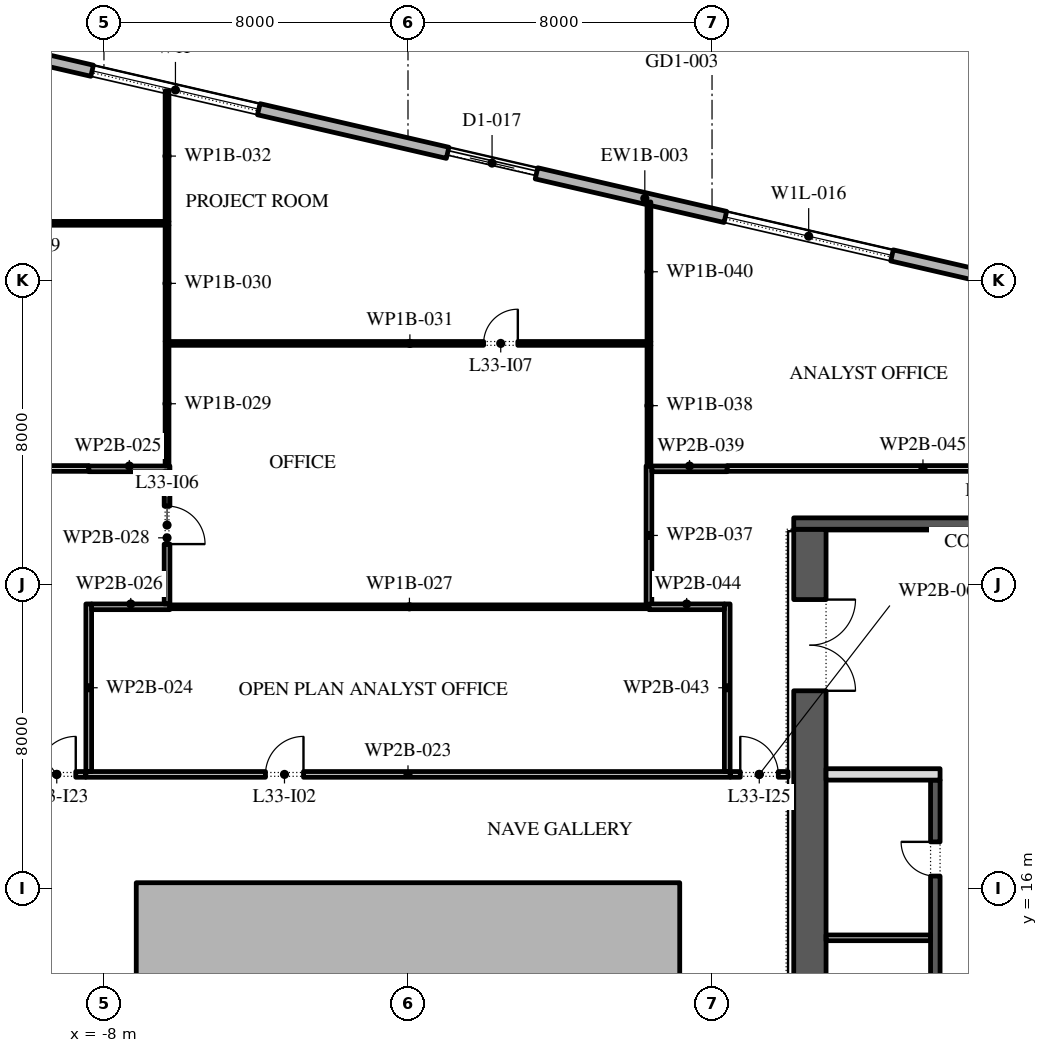
"""IFC4 building model, lengths in metres.
Left out: names, types, materials, properties, quantities, classifications, styles, units other than length and angle.
Written with IfcOpenShell. Run it as: python <this file> out.ifc"""

import sys

from ifc_helpers import new_model, si_unit, direction, frame, frame_2d, origin, place, context, subcontext, project, spatial, polyline, rectangle, outline, extrude, element, fill, save


model = new_model("IFC4")
c1 = context("Model", 3, precision=1e-05, world=origin(), true_north=direction((0.0, 1.0)))
c2 = subcontext(c1, "Body", "Model", "MODEL_VIEW")
j1 = project(units=[si_unit("LENGTHUNIT", "METRE"), si_unit("PLANEANGLEUNIT", "RADIAN")], contexts=[c1])
p1 = place(None, origin())
s1 = spatial("IfcSite", under=j1, at=p1, CompositionType="ELEMENT")
p2 = place(p1, origin())
s2 = spatial("IfcBuilding", under=s1, at=p2, CompositionType="ELEMENT")
p3 = place(p2, frame((0.0, 0.0, 151.8)))
s3 = spatial("IfcBuildingStorey", under=s2, at=p3, CompositionType="ELEMENT", Elevation=151.8)
p4 = place(p3, origin())
e1 = element("IfcWall", 1, at=p4, inside=s3, PredefinedType="STANDARD", context=c2, shape_type="SweptSolid", body=[
    extrude(outline(polyline([(-7.15, -2.15), (7.15, -2.15), (7.15, 16.15), (-7.15, 16.15), (-7.15, -2.15)]), holes=[polyline([(-7.0, -2.0), (-7.0, 16.0), (7.0, 16.0), (7.0, -2.0), (-7.0, -2.0)])]), origin(), (0.0, 0.0, 1.0), 3.95),
])
p5 = place(p3, frame((31.078, 28.421, 0.0), z_axis=(0.0, 0.0, 1.0), x_axis=(-0.974370456532, 0.224949357493, 0.0)))
e2 = element("IfcWall", 2, at=p5, inside=s3, PredefinedType="STANDARD", context=c2, shape_type="SweptSolid", body=[
    extrude(rectangle(XDim=51.0, YDim=0.3, at=frame_2d((25.5, 0.0))), origin(), (0.0, 0.0, 1.0), 3.95),
])
p6 = place(p5, frame((1.875, 0.0, 0.45)))
e3 = element("IfcOpeningElement", 3, at=p6, cuts=e2, PredefinedType="OPENING", context=c2, shape_type="SweptSolid", body=[
    extrude(rectangle(XDim=4.5, YDim=2.775, at=frame_2d((2.25, 1.387))), frame((0.0, 0.16, 0.0), z_axis=(0.0, -1.0, 0.0), x_axis=(1.0, 0.0, 0.0)), (0.0, 0.0, 1.0), 0.32),
])
p7 = place(p5, frame((10.275, 0.0, 0.45)))
e4 = element("IfcOpeningElement", 4, at=p7, cuts=e2, PredefinedType="OPENING", context=c2, shape_type="SweptSolid", body=[
    extrude(rectangle(XDim=4.5, YDim=3.05, at=frame_2d((2.25, 1.525))), frame((0.0, 0.16, 0.0), z_axis=(0.0, -1.0, 0.0), x_axis=(1.0, 0.0, 0.0)), (0.0, 0.0, 1.0), 0.32),
])
p8 = place(p5, frame((18.825, 0.0, 0.45)))
e5 = element("IfcOpeningElement", 5, at=p8, cuts=e2, PredefinedType="OPENING", context=c2, shape_type="SweptSolid", body=[
    extrude(rectangle(XDim=4.5, YDim=2.625, at=frame_2d((2.25, 1.312))), frame((0.0, 0.16, 0.0), z_axis=(0.0, -1.0, 0.0), x_axis=(1.0, 0.0, 0.0)), (0.0, 0.0, 1.0), 0.32),
])
p9 = place(p5, frame((28.425, 0.0, 0.0)))
e6 = element("IfcOpeningElement", 6, at=p9, cuts=e2, PredefinedType="OPENING", context=c2, shape_type="SweptSolid", body=[
    extrude(rectangle(XDim=2.4, YDim=3.5, at=frame_2d((1.2, 1.75))), frame((0.0, 0.16, 0.0), z_axis=(0.0, -1.0, 0.0), x_axis=(1.0, 0.0, 0.0)), (0.0, 0.0, 1.0), 0.32),
])
p10 = place(p5, frame((35.925, 0.0, 0.45)))
e7 = element("IfcOpeningElement", 7, at=p10, cuts=e2, PredefinedType="OPENING", context=c2, shape_type="SweptSolid", body=[
    extrude(rectangle(XDim=4.5, YDim=2.475, at=frame_2d((2.25, 1.238))), frame((0.0, 0.16, 0.0), z_axis=(0.0, -1.0, 0.0), x_axis=(1.0, 0.0, 0.0)), (0.0, 0.0, 1.0), 0.32),
])
p11 = place(p5, frame((44.475, 0.0, 0.45)))
e8 = element("IfcOpeningElement", 8, at=p11, cuts=e2, PredefinedType="OPENING", context=c2, shape_type="SweptSolid", body=[
    extrude(rectangle(XDim=4.5, YDim=2.4, at=frame_2d((2.25, 1.2))), frame((0.0, 0.16, 0.0), z_axis=(0.0, -1.0, 0.0), x_axis=(1.0, 0.0, 0.0)), (0.0, 0.0, 1.0), 0.32),
])
p12 = place(p3, frame((10.575, -2.45, 0.0), z_axis=(0.0, 0.0, 1.0), x_axis=(0.0, 1.0, 0.0)))
e9 = element("IfcWall", 9, at=p12, inside=s3, PredefinedType="SHEAR", context=c2, shape_type="SweptSolid", body=[
    extrude(rectangle(XDim=27.9, YDim=0.85, at=frame_2d((13.95, 0.0))), origin(), (0.0, 0.0, 1.0), 3.95),
])
p13 = place(p12, frame((23.65, 0.0, 0.0)))
e10 = element("IfcOpeningElement", 10, at=p13, cuts=e9, PredefinedType="OPENING", context=c2, shape_type="SweptSolid", body=[
    extrude(rectangle(XDim=2.4, YDim=2.1, at=frame_2d((1.2, 1.05))), frame((0.0, 0.435, 0.0), z_axis=(0.0, -1.0, 0.0), x_axis=(1.0, 0.0, 0.0)), (0.0, 0.0, 1.0), 0.87),
])
p14 = place(p12, frame((0.788, 0.0, 0.0)))
e11 = element("IfcOpeningElement", 11, at=p14, cuts=e9, PredefinedType="OPENING", context=c2, shape_type="SweptSolid", body=[
    extrude(rectangle(XDim=0.9, YDim=2.1, at=frame_2d((0.45, 1.05))), frame((0.0, 0.435, 0.0), z_axis=(0.0, -1.0, 0.0), x_axis=(1.0, 0.0, 0.0)), (0.0, 0.0, 1.0), 0.87),
])
p15 = place(p12, frame((3.962, 0.0, 0.0)))
e12 = element("IfcOpeningElement", 12, at=p15, cuts=e9, PredefinedType="OPENING", context=c2, shape_type="SweptSolid", body=[
    extrude(rectangle(XDim=1.0, YDim=2.1, at=frame_2d((0.5, 1.05))), frame((0.0, 0.435, 0.0), z_axis=(0.0, -1.0, 0.0), x_axis=(1.0, 0.0, 0.0)), (0.0, 0.0, 1.0), 0.87),
])
p16 = place(p3, frame((10.15, 25.6, 0.0), z_axis=(0.0, 0.0, 1.0), x_axis=(1.0, 0.0, 0.0)))
e13 = element("IfcWall", 13, at=p16, inside=s3, PredefinedType="SHEAR", context=c2, shape_type="SweptSolid", body=[
    extrude(rectangle(XDim=11.7, YDim=0.3, at=frame_2d((5.85, 0.0))), origin(), (0.0, 0.0, 1.0), 3.95),
])
p17 = place(p3, frame((13.875, -2.45, 0.0), z_axis=(0.0, 0.0, 1.0), x_axis=(0.0, 1.0, 0.0)))
e14 = element("IfcWall", 14, at=p17, inside=s3, PredefinedType="SHEAR", context=c2, shape_type="SweptSolid", body=[
    extrude(rectangle(XDim=21.3, YDim=0.25, at=frame_2d((10.65, 0.0))), origin(), (0.0, 0.0, 1.0), 3.95),
])
p18 = place(p17, frame((10.396, 0.0, 0.0)))
e15 = element("IfcOpeningElement", 15, at=p18, cuts=e14, PredefinedType="OPENING", context=c2, shape_type="SweptSolid", body=[
    extrude(rectangle(XDim=0.9, YDim=2.1, at=frame_2d((0.45, 1.05))), frame((0.0, 0.135, 0.0), z_axis=(0.0, -1.0, 0.0), x_axis=(1.0, 0.0, 0.0)), (0.0, 0.0, 1.0), 0.27),
])
p19 = place(p17, frame((14.6, 0.0, 0.0)))
e16 = element("IfcOpeningElement", 16, at=p19, cuts=e14, PredefinedType="OPENING", context=c2, shape_type="SweptSolid", body=[
    extrude(rectangle(XDim=0.9, YDim=2.1, at=frame_2d((0.45, 1.05))), frame((0.0, 0.135, 0.0), z_axis=(0.0, -1.0, 0.0), x_axis=(1.0, 0.0, 0.0)), (0.0, 0.0, 1.0), 0.27),
])
p20 = place(p17, frame((18.775, 0.0, 0.0)))
e17 = element("IfcOpeningElement", 17, at=p20, cuts=e14, PredefinedType="OPENING", context=c2, shape_type="SweptSolid", body=[
    extrude(rectangle(XDim=0.9, YDim=2.1, at=frame_2d((0.45, 1.05))), frame((0.0, 0.135, 0.0), z_axis=(0.0, -1.0, 0.0), x_axis=(1.0, 0.0, 0.0)), (0.0, 0.0, 1.0), 0.27),
])
p21 = place(p17, frame((6.971, 0.0, 0.0)))
e18 = element("IfcOpeningElement", 18, at=p21, cuts=e14, PredefinedType="OPENING", context=c2, shape_type="SweptSolid", body=[
    extrude(rectangle(XDim=1.1, YDim=2.1, at=frame_2d((0.55, 1.05))), frame((0.0, 0.135, 0.0), z_axis=(0.0, -1.0, 0.0), x_axis=(1.0, 0.0, 0.0)), (0.0, 0.0, 1.0), 0.27),
])
p22 = place(p3, frame((11.0, 19.0, 0.0), z_axis=(0.0, 0.0, 1.0), x_axis=(1.0, 0.0, 0.0)))
e19 = element("IfcWall", 19, at=p22, inside=s3, PredefinedType="PARTITIONING", context=c2, shape_type="SweptSolid", body=[
    extrude(rectangle(XDim=3.0, YDim=0.3, at=frame_2d((1.5, 0.0))), origin(), (0.0, 0.0, 1.0), 3.95),
])
p23 = place(p3, frame((11.0, 14.7, 0.0), z_axis=(0.0, 0.0, 1.0), x_axis=(1.0, 0.0, 0.0)))
e20 = element("IfcWall", 20, at=p23, inside=s3, PredefinedType="PARTITIONING", context=c2, shape_type="SweptSolid", body=[
    extrude(rectangle(XDim=2.75, YDim=0.15, at=frame_2d((1.375, 0.0))), origin(), (0.0, 0.0, 1.0), 3.95),
])
p24 = place(p3, frame((-18.65, 27.05, 0.0), z_axis=(0.0, 0.0, 1.0), x_axis=(1.0, 0.0, 0.0)))
e21 = element("IfcWall", 21, at=p24, inside=s3, PredefinedType="PARTITIONING", context=c2, shape_type="SweptSolid", body=[
    extrude(rectangle(XDim=10.25, YDim=0.15, at=frame_2d((5.125, 0.0))), origin(), (0.0, 0.0, 1.0), 3.95),
])
p25 = place(p24, frame((3.6, 0.0, 0.0)))
e22 = element("IfcOpeningElement", 22, at=p25, cuts=e21, PredefinedType="OPENING", context=c2, shape_type="SweptSolid", body=[
    extrude(rectangle(XDim=1.0, YDim=2.1, at=frame_2d((0.5, 1.05))), frame((0.0, 0.085, 0.0), z_axis=(0.0, -1.0, 0.0), x_axis=(1.0, 0.0, 0.0)), (0.0, 0.0, 1.0), 0.17),
])
p26 = place(p3, frame((-18.6, 33.5, 0.0), z_axis=(0.0, 0.0, 1.0), x_axis=(1.0, 0.0, 0.0)))
e23 = element("IfcWall", 23, at=p26, inside=s3, PredefinedType="PARTITIONING", context=c2, shape_type="SweptSolid", body=[
    extrude(rectangle(XDim=12.31, YDim=0.1, at=frame_2d((6.155, 0.0))), origin(), (0.0, 0.0, 1.0), 3.95),
])
p27 = place(p26, frame((8.16, 0.0, 0.0)))
e24 = element("IfcOpeningElement", 24, at=p27, cuts=e23, PredefinedType="OPENING", context=c2, shape_type="SweptSolid", body=[
    extrude(rectangle(XDim=0.9, YDim=2.1, at=frame_2d((0.45, 1.05))), frame((0.0, 0.06, 0.0), z_axis=(0.0, -1.0, 0.0), x_axis=(1.0, 0.0, 0.0)), (0.0, 0.0, 1.0), 0.12),
])
p28 = place(p3, frame((-8.475, 19.0, 0.0), z_axis=(0.0, 0.0, 1.0), x_axis=(1.0, 0.0, 0.0)))
e25 = element("IfcWall", 25, at=p28, inside=s3, PredefinedType="PARTITIONING", context=c2, shape_type="SweptSolid", body=[
    extrude(rectangle(XDim=16.95, YDim=0.15, at=frame_2d((8.475, 0.0))), origin(), (0.0, 0.0, 1.0), 3.95),
])
p29 = place(p28, frame((4.725, 0.0, 0.0)))
e26 = element("IfcOpeningElement", 26, at=p29, cuts=e25, PredefinedType="OPENING", context=c2, shape_type="SweptSolid", body=[
    extrude(rectangle(XDim=1.0, YDim=2.1, at=frame_2d((0.5, 1.05))), frame((0.0, 0.085, 0.0), z_axis=(0.0, -1.0, 0.0), x_axis=(1.0, 0.0, 0.0)), (0.0, 0.0, 1.0), 0.17),
])
p30 = place(p3, frame((-8.4, 23.485, 0.0), z_axis=(0.0, 0.0, 1.0), x_axis=(0.0, -1.0, 0.0)))
e27 = element("IfcWall", 27, at=p30, inside=s3, PredefinedType="PARTITIONING", context=c2, shape_type="SweptSolid", body=[
    extrude(rectangle(XDim=4.41, YDim=0.15, at=frame_2d((2.205, 0.0))), origin(), (0.0, 0.0, 1.0), 3.95),
])
p31 = place(p3, frame((-8.4, 27.04, 0.0), z_axis=(0.0, 0.0, 1.0), x_axis=(1.0, 0.0, 0.0)))
e28 = element("IfcWall", 28, at=p31, inside=s3, PredefinedType="PARTITIONING", context=c2, shape_type="SweptSolid", body=[
    extrude(rectangle(XDim=2.135, YDim=0.15, at=frame_2d((1.067, 0.0))), origin(), (0.0, 0.0, 1.0), 3.95),
])
p32 = place(p3, frame((-6.265, 23.41, 0.0), z_axis=(0.0, 0.0, 1.0), x_axis=(-1.0, 0.0, 0.0)))
e29 = element("IfcWall", 29, at=p32, inside=s3, PredefinedType="PARTITIONING", context=c2, shape_type="SweptSolid", body=[
    extrude(rectangle(XDim=2.06, YDim=0.15, at=frame_2d((1.03, 0.0))), origin(), (0.0, 0.0, 1.0), 3.95),
])
p33 = place(p3, frame((-6.265, 23.41, 0.0), z_axis=(0.0, 0.0, 1.0), x_axis=(1.0, 0.0, 0.0)))
e30 = element("IfcWall", 30, at=p33, inside=s3, PredefinedType="PARTITIONING", context=c2, shape_type="SweptSolid", body=[
    extrude(rectangle(XDim=12.605, YDim=0.1, at=frame_2d((6.302, 0.0))), origin(), (0.0, 0.0, 1.0), 3.95),
])
p34 = place(p3, frame((-6.34, 26.965, 0.0), z_axis=(0.0, 0.0, 1.0), x_axis=(0.0, -1.0, 0.0)))
e31 = element("IfcWall", 31, at=p34, inside=s3, PredefinedType="PARTITIONING", context=c2, shape_type="SweptSolid", body=[
    extrude(rectangle(XDim=3.48, YDim=0.15, at=frame_2d((1.74, 0.0))), origin(), (0.0, 0.0, 1.0), 3.95),
])
p35 = place(p34, frame((0.905, 0.0, 0.0)))
e32 = element("IfcOpeningElement", 32, at=p35, cuts=e31, PredefinedType="OPENING", context=c2, shape_type="SweptSolid", body=[
    extrude(rectangle(XDim=1.0, YDim=2.1, at=frame_2d((0.5, 1.05))), frame((0.0, 0.085, 0.0), z_axis=(0.0, -1.0, 0.0), x_axis=(1.0, 0.0, 0.0)), (0.0, 0.0, 1.0), 0.17),
])
p36 = place(p3, frame((-6.34, 27.115, 0.0), z_axis=(0.0, 0.0, 1.0), x_axis=(0.0, 1.0, 0.0)))
e33 = element("IfcWall", 33, at=p36, inside=s3, PredefinedType="PARTITIONING", context=c2, shape_type="SweptSolid", body=[
    extrude(rectangle(XDim=3.275, YDim=0.1, at=frame_2d((1.637, 0.0))), origin(), (0.0, 0.0, 1.0), 3.95),
])
p37 = place(p3, frame((-6.34, 30.39, 0.0), z_axis=(0.0, 0.0, 1.0), x_axis=(0.0, 1.0, 0.0)))
e34 = element("IfcWall", 34, at=p37, inside=s3, PredefinedType="PARTITIONING", context=c2, shape_type="SweptSolid", body=[
    extrude(rectangle(XDim=3.06, YDim=0.1, at=frame_2d((1.53, 0.0))), origin(), (0.0, 0.0, 1.0), 3.95),
])
p38 = place(p3, frame((-6.29, 30.34, 0.0), z_axis=(0.0, 0.0, 1.0), x_axis=(1.0, 0.0, 0.0)))
e35 = element("IfcWall", 35, at=p38, inside=s3, PredefinedType="PARTITIONING", context=c2, shape_type="SweptSolid", body=[
    extrude(rectangle(XDim=12.68, YDim=0.1, at=frame_2d((6.34, 0.0))), origin(), (0.0, 0.0, 1.0), 3.95),
])
p39 = place(p38, frame((8.28, 0.0, 0.0)))
e36 = element("IfcOpeningElement", 36, at=p39, cuts=e35, PredefinedType="OPENING", context=c2, shape_type="SweptSolid", body=[
    extrude(rectangle(XDim=0.9, YDim=2.1, at=frame_2d((0.45, 1.05))), frame((0.0, 0.06, 0.0), z_axis=(0.0, -1.0, 0.0), x_axis=(1.0, 0.0, 0.0)), (0.0, 0.0, 1.0), 0.12),
])
p40 = place(p3, frame((-6.34, 33.55, 0.0), z_axis=(0.0, 0.0, 1.0), x_axis=(0.0, 1.0, 0.0)))
e37 = element("IfcWall", 37, at=p40, inside=s3, PredefinedType="PARTITIONING", context=c2, shape_type="SweptSolid", body=[
    extrude(rectangle(XDim=3.438, YDim=0.1, at=frame_2d((1.719, 0.0))), origin(), (0.0, 0.0, 1.0), 3.95),
])
p41 = place(p3, frame((6.34, 23.46, 0.0), z_axis=(0.0, 0.0, 1.0), x_axis=(0.0, 1.0, 0.0)))
e38 = element("IfcWall", 38, at=p41, inside=s3, PredefinedType="PARTITIONING", context=c2, shape_type="SweptSolid", body=[
    extrude(rectangle(XDim=3.655, YDim=0.15, at=frame_2d((1.828, 0.0))), origin(), (0.0, 0.0, 1.0), 3.95),
])
p42 = place(p3, frame((6.34, 27.115, 0.0), z_axis=(0.0, 0.0, 1.0), x_axis=(0.0, 1.0, 0.0)))
e39 = element("IfcWall", 39, at=p42, inside=s3, PredefinedType="PARTITIONING", context=c2, shape_type="SweptSolid", body=[
    extrude(rectangle(XDim=3.175, YDim=0.1, at=frame_2d((1.587, 0.0))), origin(), (0.0, 0.0, 1.0), 3.95),
])
p43 = place(p3, frame((6.415, 27.04, 0.0), z_axis=(0.0, 0.0, 1.0), x_axis=(1.0, 0.0, 0.0)))
e40 = element("IfcWall", 40, at=p43, inside=s3, PredefinedType="PARTITIONING", context=c2, shape_type="SweptSolid", body=[
    extrude(rectangle(XDim=1.985, YDim=0.15, at=frame_2d((0.992, 0.0))), origin(), (0.0, 0.0, 1.0), 3.95),
])
p44 = place(p3, frame((6.34, 30.39, 0.0), z_axis=(0.0, 0.0, 1.0), x_axis=(0.0, 1.0, 0.0)))
e41 = element("IfcWall", 41, at=p44, inside=s3, PredefinedType="PARTITIONING", context=c2, shape_type="SweptSolid", body=[
    extrude(rectangle(XDim=3.671, YDim=0.1, at=frame_2d((1.835, 0.0))), origin(), (0.0, 0.0, 1.0), 3.95),
])
p45 = place(p3, frame((8.4, 19.075, 0.0), z_axis=(0.0, 0.0, 1.0), x_axis=(0.0, 1.0, 0.0)))
e42 = element("IfcWall", 42, at=p45, inside=s3, PredefinedType="PARTITIONING", context=c2, shape_type="SweptSolid", body=[
    extrude(rectangle(XDim=4.41, YDim=0.15, at=frame_2d((2.205, 0.0))), origin(), (0.0, 0.0, 1.0), 3.95),
])
p46 = place(p3, frame((8.325, 23.41, 0.0), z_axis=(0.0, 0.0, 1.0), x_axis=(-1.0, 0.0, 0.0)))
e43 = element("IfcWall", 43, at=p46, inside=s3, PredefinedType="PARTITIONING", context=c2, shape_type="SweptSolid", body=[
    extrude(rectangle(XDim=1.985, YDim=0.15, at=frame_2d((0.992, 0.0))), origin(), (0.0, 0.0, 1.0), 3.95),
])
p47 = place(p3, frame((8.4, 27.05, 0.0), z_axis=(0.0, 0.0, 1.0), x_axis=(1.0, 0.0, 0.0)))
e44 = element("IfcWall", 44, at=p47, inside=s3, PredefinedType="PARTITIONING", context=c2, shape_type="SweptSolid", body=[
    extrude(rectangle(XDim=10.3, YDim=0.15, at=frame_2d((5.15, 0.0))), origin(), (0.0, 0.0, 1.0), 3.95),
])
p48 = place(p47, frame((6.6, 0.0, 0.0)))
e45 = element("IfcOpeningElement", 45, at=p48, cuts=e44, PredefinedType="OPENING", context=c2, shape_type="SweptSolid", body=[
    extrude(rectangle(XDim=1.0, YDim=2.1, at=frame_2d((0.5, 1.05))), frame((0.0, 0.085, 0.0), z_axis=(0.0, -1.0, 0.0), x_axis=(1.0, 0.0, 0.0)), (0.0, 0.0, 1.0), 0.17),
])
p49 = place(p3, frame((-10.0, 19.0, 0.0), z_axis=(0.0, 0.0, 1.0), x_axis=(1.0, 0.0, 0.0)))
e46 = element("IfcWall", 46, at=p49, inside=s3, PredefinedType="PARTITIONING", context=c2, shape_type="SweptSolid", body=[
    extrude(rectangle(XDim=1.515, YDim=0.15, at=frame_2d((0.757, 0.0))), origin(), (0.0, 0.0, 1.0), 3.95),
])
p50 = place(p49, frame((0.258, 0.0, 0.0)))
e47 = element("IfcOpeningElement", 47, at=p50, cuts=e46, PredefinedType="OPENING", context=c2, shape_type="SweptSolid", body=[
    extrude(rectangle(XDim=1.0, YDim=2.1, at=frame_2d((0.5, 1.05))), frame((0.0, 0.085, 0.0), z_axis=(0.0, -1.0, 0.0), x_axis=(1.0, 0.0, 0.0)), (0.0, 0.0, 1.0), 0.17),
])
p51 = place(p3, frame((8.485, 19.0, 0.0), z_axis=(0.0, 0.0, 1.0), x_axis=(1.0, 0.0, 0.0)))
e48 = element("IfcWall", 48, at=p51, inside=s3, PredefinedType="PARTITIONING", context=c2, shape_type="SweptSolid", body=[
    extrude(rectangle(XDim=1.515, YDim=0.15, at=frame_2d((0.757, 0.0))), origin(), (0.0, 0.0, 1.0), 3.95),
])
p52 = place(p51, frame((0.258, 0.0, 0.0)))
e49 = element("IfcOpeningElement", 49, at=p52, cuts=e48, PredefinedType="OPENING", context=c2, shape_type="SweptSolid", body=[
    extrude(rectangle(XDim=1.0, YDim=2.1, at=frame_2d((0.5, 1.05))), frame((0.0, 0.085, 0.0), z_axis=(0.0, -1.0, 0.0), x_axis=(1.0, 0.0, 0.0)), (0.0, 0.0, 1.0), 0.17),
])
p53 = place(p8, origin())
e50 = element("IfcWindow", 50, at=p53, inside=s3, PartitioningType="DOUBLE_PANEL_VERTICAL", PredefinedType="WINDOW", context=c2, shape_type="SweptSolid", body=[
    extrude(rectangle(XDim=4.5, YDim=2.625, at=frame_2d((2.25, 1.312))), frame((0.0, 0.03, 0.0), z_axis=(0.0, -1.0, 0.0), x_axis=(1.0, 0.0, 0.0)), (0.0, 0.0, 1.0), 0.06),
])
fill(e5, e50)
p54 = place(p9, origin())
e51 = element("IfcDoor", 51, at=p54, inside=s3, OperationType="DOUBLE_DOOR_SLIDING", PredefinedType="DOOR", context=c2, shape_type="SweptSolid", body=[
    extrude(rectangle(XDim=2.4, YDim=3.5, at=frame_2d((1.2, 1.75))), frame((0.0, 0.025, 0.0), z_axis=(0.0, -1.0, 0.0), x_axis=(1.0, 0.0, 0.0)), (0.0, 0.0, 1.0), 0.05),
])
fill(e6, e51)
p55 = place(p10, origin())
e52 = element("IfcWindow", 52, at=p55, inside=s3, PartitioningType="DOUBLE_PANEL_VERTICAL", PredefinedType="WINDOW", context=c2, shape_type="SweptSolid", body=[
    extrude(rectangle(XDim=4.5, YDim=2.475, at=frame_2d((2.25, 1.238))), frame((0.0, 0.03, 0.0), z_axis=(0.0, -1.0, 0.0), x_axis=(1.0, 0.0, 0.0)), (0.0, 0.0, 1.0), 0.06),
])
fill(e7, e52)
p56 = place(p20, origin())
e53 = element("IfcDoor", 53, at=p56, inside=s3, OperationType="SINGLE_SWING_LEFT", PredefinedType="DOOR", context=c2, shape_type="SweptSolid", body=[
    extrude(rectangle(XDim=0.9, YDim=2.1, at=frame_2d((0.45, 1.05))), frame((0.0, 0.125, 0.0), z_axis=(0.0, -1.0, 0.0), x_axis=(1.0, 0.0, 0.0)), (0.0, 0.0, 1.0), 0.05),
])
fill(e17, e53)
p57 = place(p13, frame((2.4, 0.0, 0.0), z_axis=(0.0, 0.0, 1.0), x_axis=(-1.0, 0.0, 0.0)))
e54 = element("IfcDoor", 54, at=p57, inside=s3, OperationType="DOUBLE_DOOR_SINGLE_SWING", PredefinedType="DOOR", context=c2, shape_type="SweptSolid", body=[
    extrude(rectangle(XDim=2.4, YDim=2.1, at=frame_2d((1.2, 1.05))), frame((0.0, 0.025, 0.0), z_axis=(0.0, -1.0, 0.0), x_axis=(1.0, 0.0, 0.0)), (0.0, 0.0, 1.0), 0.05),
])
fill(e10, e54)
p58 = place(p29, origin())
e55 = element("IfcDoor", 55, at=p58, inside=s3, OperationType="SINGLE_SWING_LEFT", PredefinedType="DOOR", context=c2, shape_type="SweptSolid", body=[
    extrude(rectangle(XDim=1.0, YDim=2.1, at=frame_2d((0.5, 1.05))), frame((0.0, 0.025, 0.0), z_axis=(0.0, -1.0, 0.0), x_axis=(1.0, 0.0, 0.0)), (0.0, 0.0, 1.0), 0.05),
])
fill(e26, e55)
p59 = place(p35, origin())
e56 = element("IfcDoor", 56, at=p59, inside=s3, OperationType="SINGLE_SWING_LEFT", PredefinedType="DOOR", context=c2, shape_type="SweptSolid", body=[
    extrude(rectangle(XDim=1.0, YDim=2.1, at=frame_2d((0.5, 1.05))), frame((0.0, 0.025, 0.0), z_axis=(0.0, -1.0, 0.0), x_axis=(1.0, 0.0, 0.0)), (0.0, 0.0, 1.0), 0.05),
])
fill(e32, e56)
p60 = place(p39, origin())
e57 = element("IfcDoor", 57, at=p60, inside=s3, OperationType="SINGLE_SWING_LEFT", PredefinedType="DOOR", context=c2, shape_type="SweptSolid", body=[
    extrude(rectangle(XDim=0.9, YDim=2.1, at=frame_2d((0.45, 1.05))), frame((0.0, 0.025, 0.0), z_axis=(0.0, -1.0, 0.0), x_axis=(1.0, 0.0, 0.0)), (0.0, 0.0, 1.0), 0.05),
])
fill(e36, e57)
p61 = place(p50, origin())
e58 = element("IfcDoor", 58, at=p61, inside=s3, OperationType="SINGLE_SWING_LEFT", PredefinedType="DOOR", context=c2, shape_type="SweptSolid", body=[
    extrude(rectangle(XDim=1.0, YDim=2.1, at=frame_2d((0.5, 1.05))), frame((0.0, 0.025, 0.0), z_axis=(0.0, -1.0, 0.0), x_axis=(1.0, 0.0, 0.0)), (0.0, 0.0, 1.0), 0.05),
])
fill(e47, e58)
p62 = place(p52, origin())
e59 = element("IfcDoor", 59, at=p62, inside=s3, OperationType="SINGLE_SWING_RIGHT", PredefinedType="DOOR", context=c2, shape_type="SweptSolid", body=[
    extrude(rectangle(XDim=1.0, YDim=2.1, at=frame_2d((0.5, 1.05))), frame((0.0, 0.025, 0.0), z_axis=(0.0, -1.0, 0.0), x_axis=(1.0, 0.0, 0.0)), (0.0, 0.0, 1.0), 0.05),
])
fill(e49, e59)
save(model, sys.argv[1])
